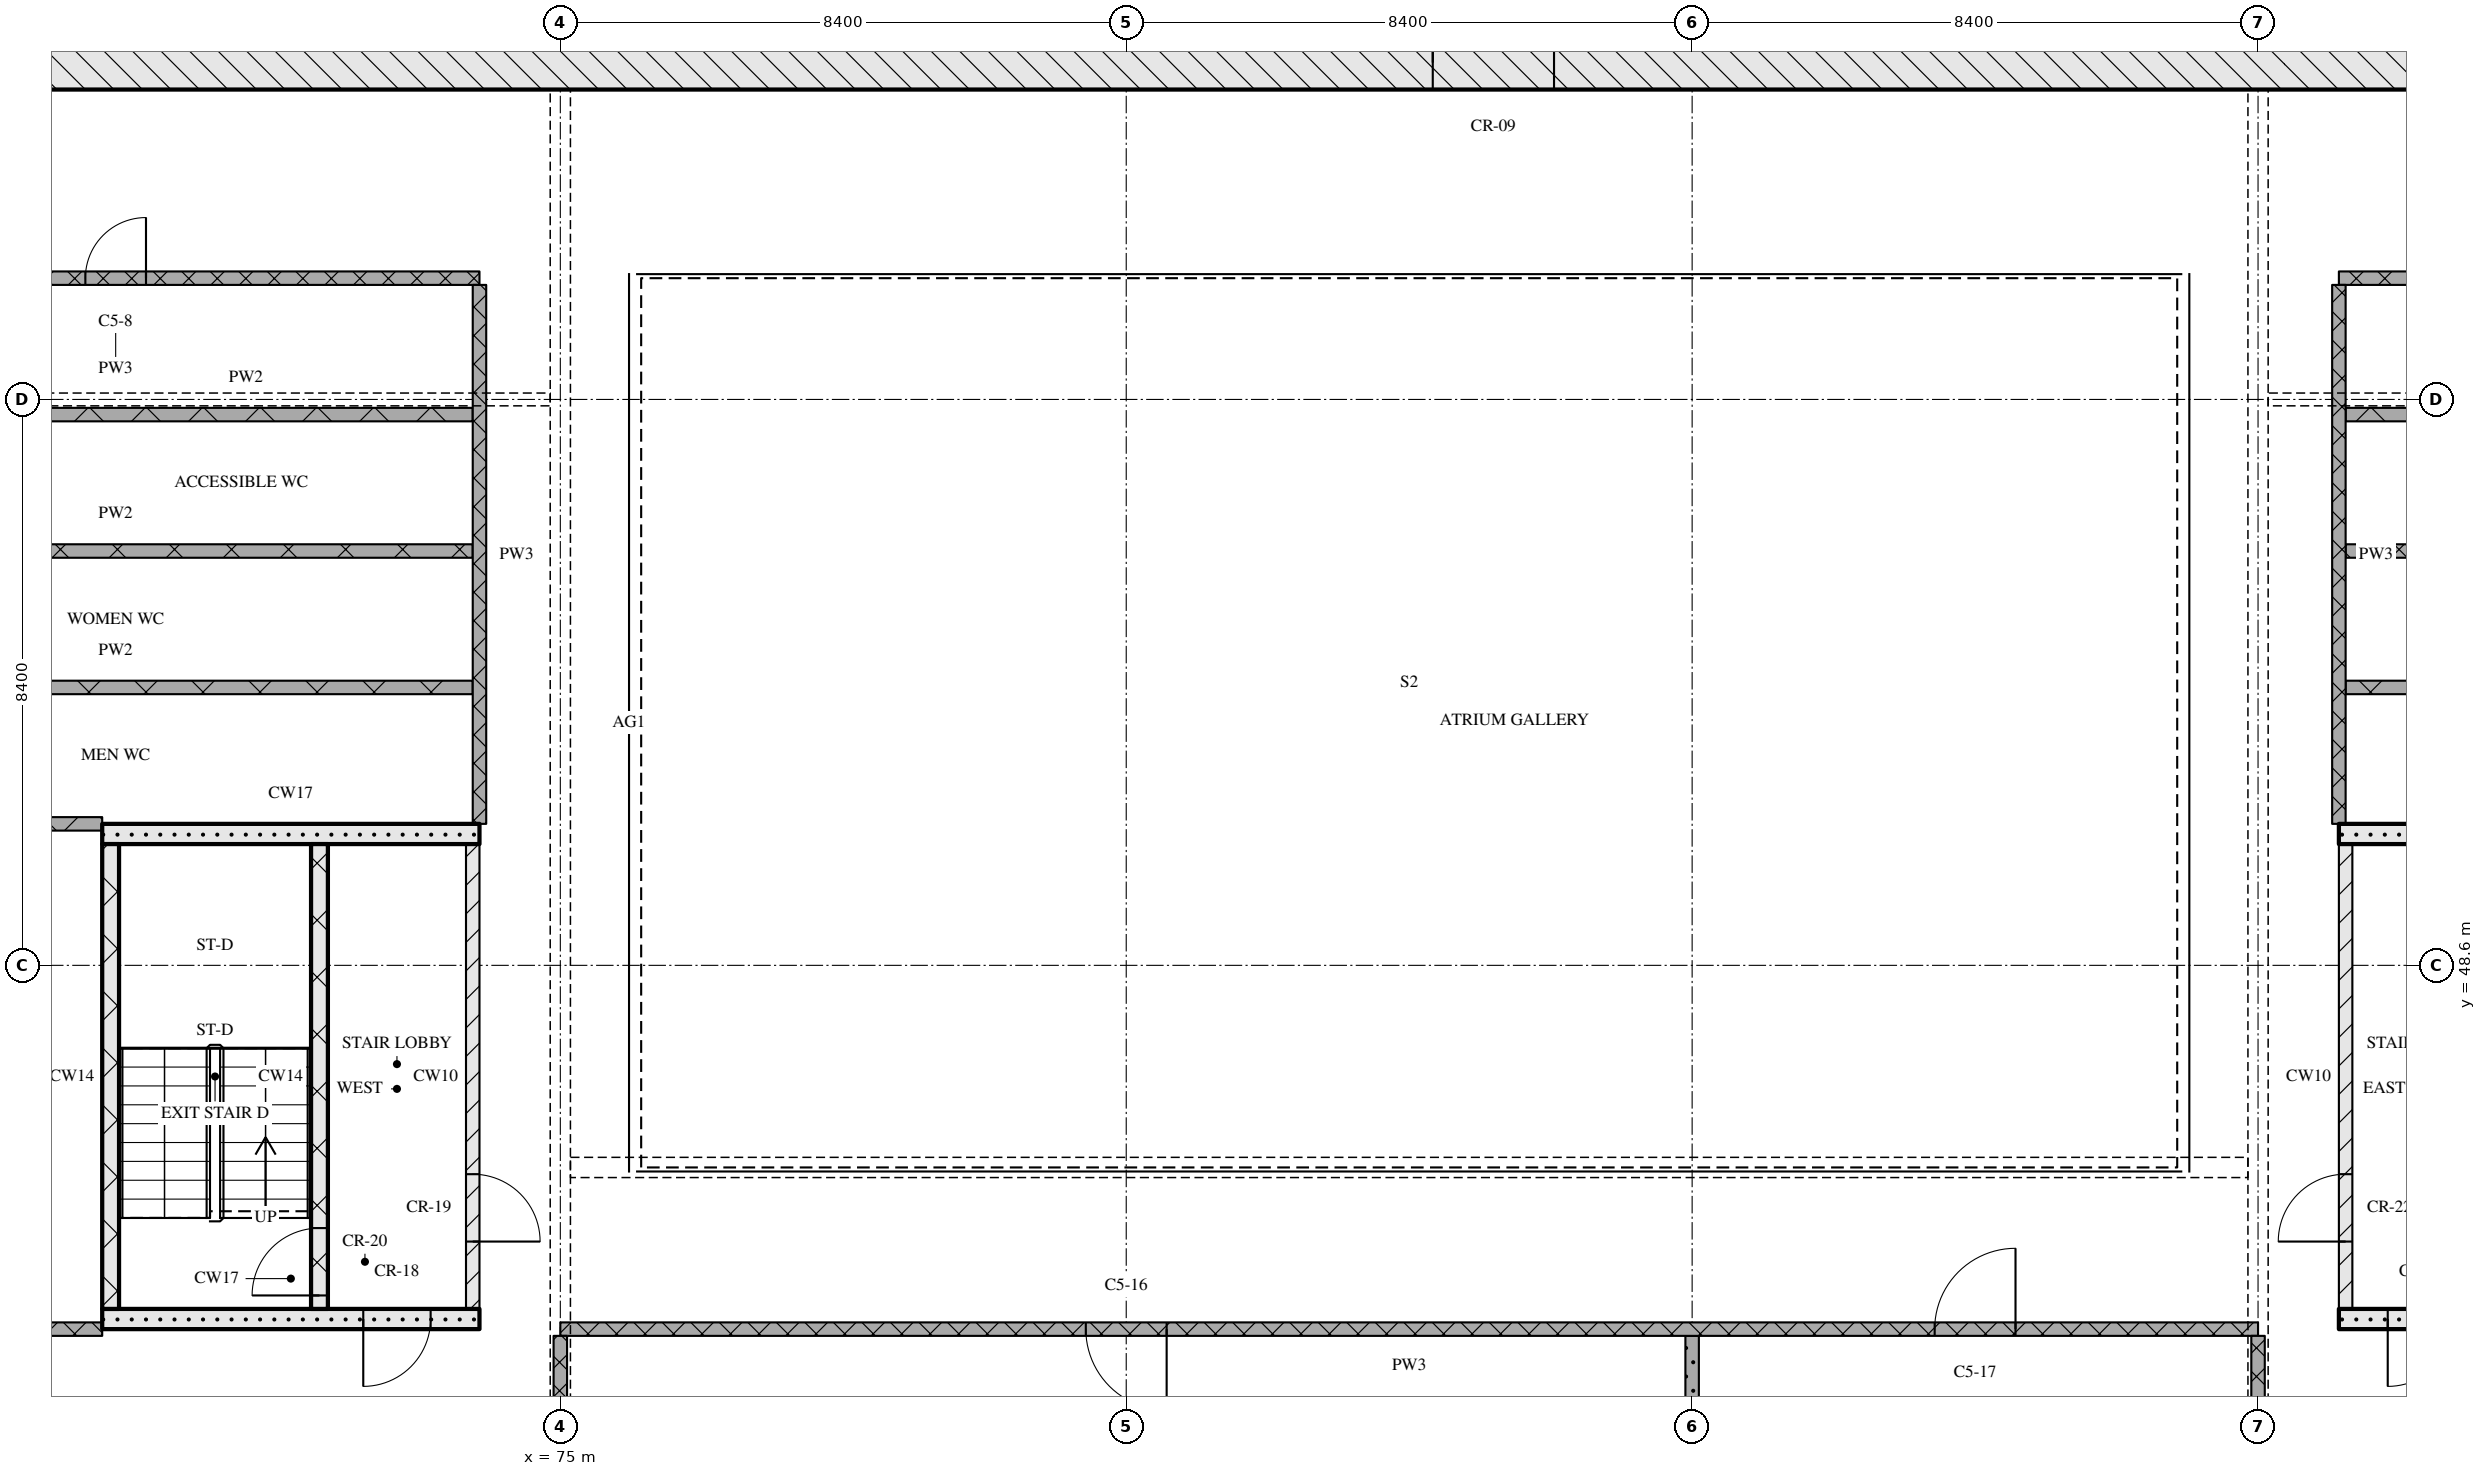
"""IFC4 building model, lengths in metres.
Left out: names, types, materials, properties, quantities, classifications, styles, units other than length and angle.
Written with IfcOpenShell. Run it as: python <this file> out.ifc"""

import sys

from ifc_helpers import new_model, si_unit, direction, frame, frame_2d, origin, place, context, subcontext, project, spatial, rectangle, extrude, element, fill, save


model = new_model("IFC4")
c1 = context("Model", 3, precision=1e-05, world=origin(), true_north=direction((0.0, 1.0)))
c2 = subcontext(c1, "Body", "Model", "MODEL_VIEW")
j1 = project(units=[si_unit("LENGTHUNIT", "METRE"), si_unit("PLANEANGLEUNIT", "RADIAN")], contexts=[c1])
p1 = place(None, origin())
s1 = spatial("IfcSite", under=j1, at=p1, CompositionType="ELEMENT")
p2 = place(p1, origin())
s2 = spatial("IfcBuilding", under=s1, at=p2, CompositionType="ELEMENT")
p3 = place(p2, frame((0.0, 0.0, 190.65)))
s3 = spatial("IfcBuildingStorey", under=s2, at=p3, CompositionType="ELEMENT", Elevation=190.65)
p4 = place(p3, frame((67.0, 62.0, 0.0), z_axis=(0.0, 0.0, 1.0), x_axis=(1.0, 0.0, 0.0)))
e1 = element("IfcWall", 1, at=p4, inside=s3, PredefinedType="SOLIDWALL", context=c2, shape_type="SweptSolid", body=[
    extrude(rectangle(XDim=41.2, YDim=0.8, at=frame_2d((20.6, 0.0))), origin(), (0.0, 0.0, 1.0), 3.3),
])
p5 = place(p4, frame((20.95, 0.0, 0.0)))
e2 = element("IfcOpeningElement", 2, at=p5, cuts=e1, PredefinedType="OPENING", context=c2, shape_type="SweptSolid", body=[
    extrude(rectangle(XDim=1.8, YDim=2.1, at=frame_2d((0.9, 1.05))), frame((0.0, 0.41, 0.0), z_axis=(0.0, -1.0, 0.0), x_axis=(1.0, 0.0, 0.0)), (0.0, 0.0, 1.0), 0.82),
])
p6 = place(p3, frame((68.2, 43.35, 0.0), z_axis=(0.0, 0.0, 1.0), x_axis=(1.0, 0.0, 0.0)))
e3 = element("IfcWall", 3, at=p6, inside=s3, PredefinedType="SOLIDWALL", context=c2, shape_type="SweptSolid", body=[
    extrude(rectangle(XDim=5.6, YDim=0.3, at=frame_2d((2.8, 0.0))), origin(), (0.0, 0.0, 1.0), 3.3),
])
p7 = place(p6, frame((3.875, 0.0, 0.0)))
e4 = element("IfcOpeningElement", 4, at=p7, cuts=e3, PredefinedType="OPENING", context=c2, shape_type="SweptSolid", body=[
    extrude(rectangle(XDim=1.0, YDim=2.1, at=frame_2d((0.5, 1.05))), frame((0.0, 0.16, 0.0), z_axis=(0.0, -1.0, 0.0), x_axis=(1.0, 0.0, 0.0)), (0.0, 0.0, 1.0), 0.32),
])
p8 = place(p3, frame((68.325, 43.5, 0.0), z_axis=(0.0, 0.0, 1.0), x_axis=(0.0, 1.0, 0.0)))
e5 = element("IfcWall", 5, at=p8, inside=s3, PredefinedType="SOLIDWALL", context=c2, shape_type="SweptSolid", body=[
    extrude(rectangle(XDim=6.9, YDim=0.25, at=frame_2d((3.45, 0.0))), origin(), (0.0, 0.0, 1.0), 3.3),
])
p9 = place(p3, frame((71.425, 43.5, 0.0), z_axis=(0.0, 0.0, 1.0), x_axis=(0.0, 1.0, 0.0)))
e6 = element("IfcWall", 6, at=p9, inside=s3, PredefinedType="SOLIDWALL", context=c2, shape_type="SweptSolid", body=[
    extrude(rectangle(XDim=6.9, YDim=0.25, at=frame_2d((3.45, 0.0))), origin(), (0.0, 0.0, 1.0), 3.3),
])
p10 = place(p9, frame((0.2, 0.0, 0.0)))
e7 = element("IfcOpeningElement", 7, at=p10, cuts=e6, PredefinedType="OPENING", context=c2, shape_type="SweptSolid", body=[
    extrude(rectangle(XDim=1.0, YDim=2.1, at=frame_2d((0.5, 1.05))), frame((0.0, 0.135, 0.0), z_axis=(0.0, -1.0, 0.0), x_axis=(1.0, 0.0, 0.0)), (0.0, 0.0, 1.0), 0.27),
])
p11 = place(p3, frame((73.7, 43.5, 0.0), z_axis=(0.0, 0.0, 1.0), x_axis=(0.0, 1.0, 0.0)))
e8 = element("IfcWall", 8, at=p11, inside=s3, PredefinedType="PARTITIONING", context=c2, shape_type="SweptSolid", body=[
    extrude(rectangle(XDim=6.9, YDim=0.2, at=frame_2d((3.45, 0.0))), origin(), (0.0, 0.0, 1.0), 3.3),
])
p12 = place(p11, frame((1.0, 0.0, 0.0)))
e9 = element("IfcOpeningElement", 9, at=p12, cuts=e8, PredefinedType="OPENING", context=c2, shape_type="SweptSolid", body=[
    extrude(rectangle(XDim=1.0, YDim=2.1, at=frame_2d((0.5, 1.05))), frame((0.0, 0.11, 0.0), z_axis=(0.0, -1.0, 0.0), x_axis=(1.0, 0.0, 0.0)), (0.0, 0.0, 1.0), 0.22),
])
p13 = place(p3, frame((68.2, 50.55, 0.0), z_axis=(0.0, 0.0, 1.0), x_axis=(1.0, 0.0, 0.0)))
e10 = element("IfcWall", 10, at=p13, inside=s3, PredefinedType="SOLIDWALL", context=c2, shape_type="SweptSolid", body=[
    extrude(rectangle(XDim=5.6, YDim=0.3, at=frame_2d((2.8, 0.0))), origin(), (0.0, 0.0, 1.0), 3.3),
])
p14 = place(p3, frame((101.4, 43.35, 0.0), z_axis=(0.0, 0.0, 1.0), x_axis=(1.0, 0.0, 0.0)))
e11 = element("IfcWall", 11, at=p14, inside=s3, PredefinedType="SOLIDWALL", context=c2, shape_type="SweptSolid", body=[
    extrude(rectangle(XDim=5.6, YDim=0.3, at=frame_2d((2.8, 0.0))), origin(), (0.0, 0.0, 1.0), 3.3),
])
p15 = place(p14, frame((0.725, 0.0, 0.0)))
e12 = element("IfcOpeningElement", 12, at=p15, cuts=e11, PredefinedType="OPENING", context=c2, shape_type="SweptSolid", body=[
    extrude(rectangle(XDim=1.0, YDim=2.1, at=frame_2d((0.5, 1.05))), frame((0.0, 0.16, 0.0), z_axis=(0.0, -1.0, 0.0), x_axis=(1.0, 0.0, 0.0)), (0.0, 0.0, 1.0), 0.32),
])
p16 = place(p3, frame((101.5, 43.5, 0.0), z_axis=(0.0, 0.0, 1.0), x_axis=(0.0, 1.0, 0.0)))
e13 = element("IfcWall", 13, at=p16, inside=s3, PredefinedType="PARTITIONING", context=c2, shape_type="SweptSolid", body=[
    extrude(rectangle(XDim=6.9, YDim=0.2, at=frame_2d((3.45, 0.0))), origin(), (0.0, 0.0, 1.0), 3.3),
])
p17 = place(p16, frame((1.0, 0.0, 0.0)))
e14 = element("IfcOpeningElement", 14, at=p17, cuts=e13, PredefinedType="OPENING", context=c2, shape_type="SweptSolid", body=[
    extrude(rectangle(XDim=1.0, YDim=2.1, at=frame_2d((0.5, 1.05))), frame((0.0, 0.11, 0.0), z_axis=(0.0, -1.0, 0.0), x_axis=(1.0, 0.0, 0.0)), (0.0, 0.0, 1.0), 0.22),
])
p18 = place(p3, frame((101.4, 50.55, 0.0), z_axis=(0.0, 0.0, 1.0), x_axis=(1.0, 0.0, 0.0)))
e15 = element("IfcWall", 15, at=p18, inside=s3, PredefinedType="SOLIDWALL", context=c2, shape_type="SweptSolid", body=[
    extrude(rectangle(XDim=5.6, YDim=0.3, at=frame_2d((2.8, 0.0))), origin(), (0.0, 0.0, 1.0), 3.3),
])
p19 = place(p3, frame((63.0, 43.2, 0.0), z_axis=(0.0, 0.0, 1.0), x_axis=(1.0, 0.0, 0.0)))
e16 = element("IfcWall", 16, at=p19, inside=s3, PredefinedType="PARTITIONING", context=c2, shape_type="SweptSolid", body=[
    extrude(rectangle(XDim=5.2, YDim=0.2, at=frame_2d((2.6, 0.0))), origin(), (0.0, 0.0, 1.0), 3.3),
])
p20 = place(p3, frame((100.2, 43.2, 0.0), z_axis=(0.0, 0.0, 1.0), x_axis=(-1.0, 0.0, 0.0)))
e17 = element("IfcWall", 17, at=p20, inside=s3, PredefinedType="PARTITIONING", context=c2, shape_type="SweptSolid", body=[
    extrude(rectangle(XDim=25.2, YDim=0.2, at=frame_2d((12.6, 0.0))), origin(), (0.0, 0.0, 1.0), 3.3),
])
p21 = place(p20, frame((3.6, 0.0, 0.0)))
e18 = element("IfcOpeningElement", 18, at=p21, cuts=e17, PredefinedType="OPENING", context=c2, shape_type="SweptSolid", body=[
    extrude(rectangle(XDim=1.2, YDim=2.1, at=frame_2d((0.6, 1.05))), frame((0.0, 0.11, 0.0), z_axis=(0.0, -1.0, 0.0), x_axis=(1.0, 0.0, 0.0)), (0.0, 0.0, 1.0), 0.22),
])
p22 = place(p20, frame((16.2, 0.0, 0.0)))
e19 = element("IfcOpeningElement", 19, at=p22, cuts=e17, PredefinedType="OPENING", context=c2, shape_type="SweptSolid", body=[
    extrude(rectangle(XDim=1.2, YDim=2.1, at=frame_2d((0.6, 1.05))), frame((0.0, 0.11, 0.0), z_axis=(0.0, -1.0, 0.0), x_axis=(1.0, 0.0, 0.0)), (0.0, 0.0, 1.0), 0.22),
])
p23 = place(p3, frame((63.1, 50.7, 0.0), z_axis=(0.0, 0.0, 1.0), x_axis=(1.0, 0.0, 0.0)))
e20 = element("IfcWall", 20, at=p23, inside=s3, PredefinedType="PARTITIONING", context=c2, shape_type="SweptSolid", body=[
    extrude(rectangle(XDim=5.1, YDim=0.2, at=frame_2d((2.55, 0.0))), origin(), (0.0, 0.0, 1.0), 3.3),
])
p24 = place(p3, frame((63.1, 52.725, 0.0), z_axis=(0.0, 0.0, 1.0), x_axis=(1.0, 0.0, 0.0)))
e21 = element("IfcWall", 21, at=p24, inside=s3, PredefinedType="PARTITIONING", context=c2, shape_type="SweptSolid", body=[
    extrude(rectangle(XDim=10.6, YDim=0.2, at=frame_2d((5.3, 0.0))), origin(), (0.0, 0.0, 1.0), 3.3),
])
p25 = place(p3, frame((101.5, 52.725, 0.0), z_axis=(0.0, 0.0, 1.0), x_axis=(1.0, 0.0, 0.0)))
e22 = element("IfcWall", 22, at=p25, inside=s3, PredefinedType="PARTITIONING", context=c2, shape_type="SweptSolid", body=[
    extrude(rectangle(XDim=10.6, YDim=0.2, at=frame_2d((5.3, 0.0))), origin(), (0.0, 0.0, 1.0), 3.3),
])
p26 = place(p3, frame((63.1, 54.75, 0.0), z_axis=(0.0, 0.0, 1.0), x_axis=(1.0, 0.0, 0.0)))
e23 = element("IfcWall", 23, at=p26, inside=s3, PredefinedType="PARTITIONING", context=c2, shape_type="SweptSolid", body=[
    extrude(rectangle(XDim=10.6, YDim=0.2, at=frame_2d((5.3, 0.0))), origin(), (0.0, 0.0, 1.0), 3.3),
])
p27 = place(p3, frame((101.5, 54.75, 0.0), z_axis=(0.0, 0.0, 1.0), x_axis=(1.0, 0.0, 0.0)))
e24 = element("IfcWall", 24, at=p27, inside=s3, PredefinedType="PARTITIONING", context=c2, shape_type="SweptSolid", body=[
    extrude(rectangle(XDim=10.6, YDim=0.2, at=frame_2d((5.3, 0.0))), origin(), (0.0, 0.0, 1.0), 3.3),
])
for number, where, z_axis, x_axis in (
    (25, (66.97, 56.775, 0.0), (0.0, 0.0, 1.0), (1.0, 0.0, 0.0)),
    (26, (101.5, 56.775, 0.0), (0.0, 0.0, 1.0), (1.0, 0.0, 0.0)),
):
    element("IfcWall", number, at=place(p3, frame(where, z_axis=z_axis, x_axis=x_axis)), inside=s3, PredefinedType="PARTITIONING", context=c2, shape_type="SweptSolid", body=[
        extrude(rectangle(XDim=6.73, YDim=0.2, at=frame_2d((3.365, 0.0))), origin(), (0.0, 0.0, 1.0), 3.3),
    ])
p28 = place(p3, frame((73.8, 58.8, 0.0), z_axis=(0.0, 0.0, 1.0), x_axis=(-1.0, 0.0, 0.0)))
e27 = element("IfcWall", 27, at=p28, inside=s3, PredefinedType="PARTITIONING", context=c2, shape_type="SweptSolid", body=[
    extrude(rectangle(XDim=10.8, YDim=0.2, at=frame_2d((5.4, 0.0))), origin(), (0.0, 0.0, 1.0), 3.3),
])
p29 = place(p28, frame((4.95, 0.0, 0.0)))
e28 = element("IfcOpeningElement", 28, at=p29, cuts=e27, PredefinedType="OPENING", context=c2, shape_type="SweptSolid", body=[
    extrude(rectangle(XDim=0.9, YDim=2.1, at=frame_2d((0.45, 1.05))), frame((0.0, 0.11, 0.0), z_axis=(0.0, -1.0, 0.0), x_axis=(1.0, 0.0, 0.0)), (0.0, 0.0, 1.0), 0.22),
])
p30 = place(p3, frame((101.4, 58.8, 0.0), z_axis=(0.0, 0.0, 1.0), x_axis=(1.0, 0.0, 0.0)))
e29 = element("IfcWall", 29, at=p30, inside=s3, PredefinedType="PARTITIONING", context=c2, shape_type="SweptSolid", body=[
    extrude(rectangle(XDim=10.8, YDim=0.2, at=frame_2d((5.4, 0.0))), origin(), (0.0, 0.0, 1.0), 3.3),
])
p31 = place(p3, frame((73.8, 58.7, 0.0), z_axis=(0.0, 0.0, 1.0), x_axis=(0.0, -1.0, 0.0)))
e30 = element("IfcWall", 30, at=p31, inside=s3, PredefinedType="PARTITIONING", context=c2, shape_type="SweptSolid", body=[
    extrude(rectangle(XDim=8.0, YDim=0.2, at=frame_2d((4.0, 0.0))), origin(), (0.0, 0.0, 1.0), 3.3),
])
p32 = place(p3, frame((75.0, 43.1, 0.0), z_axis=(0.0, 0.0, 1.0), x_axis=(0.0, -1.0, 0.0)))
e31 = element("IfcWall", 31, at=p32, inside=s3, PredefinedType="PARTITIONING", context=c2, shape_type="SweptSolid", body=[
    extrude(rectangle(XDim=2.2, YDim=0.2, at=frame_2d((1.1, 0.0))), origin(), (0.0, 0.0, 1.0), 2.41),
])
p33 = place(p3, frame((91.8, 43.1, 0.0), z_axis=(0.0, 0.0, 1.0), x_axis=(0.0, -1.0, 0.0)))
e32 = element("IfcWall", 32, at=p33, inside=s3, PredefinedType="PARTITIONING", context=c2, shape_type="SweptSolid", body=[
    extrude(rectangle(XDim=2.53, YDim=0.2, at=frame_2d((1.265, 0.0))), origin(), (0.0, 0.0, 1.0), 3.3),
])
p34 = place(p3, frame((100.2, 43.1, 0.0), z_axis=(0.0, 0.0, 1.0), x_axis=(0.0, -1.0, 0.0)))
e33 = element("IfcWall", 33, at=p34, inside=s3, PredefinedType="PARTITIONING", context=c2, shape_type="SweptSolid", body=[
    extrude(rectangle(XDim=2.2, YDim=0.2, at=frame_2d((1.1, 0.0))), origin(), (0.0, 0.0, 1.0), 2.41),
])
p35 = place(p3, frame((101.4, 58.7, 0.0), z_axis=(0.0, 0.0, 1.0), x_axis=(0.0, -1.0, 0.0)))
e34 = element("IfcWall", 34, at=p35, inside=s3, PredefinedType="PARTITIONING", context=c2, shape_type="SweptSolid", body=[
    extrude(rectangle(XDim=8.0, YDim=0.2, at=frame_2d((4.0, 0.0))), origin(), (0.0, 0.0, 1.0), 3.3),
])
p36 = place(p5, origin())
e35 = element("IfcDoor", 35, at=p36, inside=s3, OperationType="DOUBLE_DOOR_SINGLE_SWING", PredefinedType="DOOR", context=c2, shape_type="SweptSolid", body=[
    extrude(rectangle(XDim=1.8, YDim=2.1, at=frame_2d((0.9, 1.05))), frame((0.0, 0.025, 0.0), z_axis=(0.0, -1.0, 0.0), x_axis=(1.0, 0.0, 0.0)), (0.0, 0.0, 1.0), 0.05),
])
fill(e2, e35)
p37 = place(p7, origin())
e36 = element("IfcDoor", 36, at=p37, inside=s3, OperationType="SINGLE_SWING_RIGHT", PredefinedType="DOOR", context=c2, shape_type="SweptSolid", body=[
    extrude(rectangle(XDim=1.0, YDim=2.1, at=frame_2d((0.5, 1.05))), frame((0.0, 0.025, 0.0), z_axis=(0.0, -1.0, 0.0), x_axis=(1.0, 0.0, 0.0)), (0.0, 0.0, 1.0), 0.05),
])
fill(e4, e36)
p38 = place(p10, origin())
e37 = element("IfcDoor", 37, at=p38, inside=s3, OperationType="SINGLE_SWING_LEFT", PredefinedType="DOOR", context=c2, shape_type="SweptSolid", body=[
    extrude(rectangle(XDim=1.0, YDim=2.1, at=frame_2d((0.5, 1.05))), frame((0.0, 0.025, 0.0), z_axis=(0.0, -1.0, 0.0), x_axis=(1.0, 0.0, 0.0)), (0.0, 0.0, 1.0), 0.05),
])
fill(e7, e37)
p39 = place(p12, origin())
e38 = element("IfcDoor", 38, at=p39, inside=s3, OperationType="SINGLE_SWING_RIGHT", PredefinedType="DOOR", context=c2, shape_type="SweptSolid", body=[
    extrude(rectangle(XDim=1.0, YDim=2.1, at=frame_2d((0.5, 1.05))), frame((0.0, 0.025, 0.0), z_axis=(0.0, -1.0, 0.0), x_axis=(1.0, 0.0, 0.0)), (0.0, 0.0, 1.0), 0.05),
])
fill(e9, e38)
p40 = place(p15, origin())
e39 = element("IfcDoor", 39, at=p40, inside=s3, OperationType="SINGLE_SWING_RIGHT", PredefinedType="DOOR", context=c2, shape_type="SweptSolid", body=[
    extrude(rectangle(XDim=1.0, YDim=2.1, at=frame_2d((0.5, 1.05))), frame((0.0, 0.025, 0.0), z_axis=(0.0, -1.0, 0.0), x_axis=(1.0, 0.0, 0.0)), (0.0, 0.0, 1.0), 0.05),
])
fill(e12, e39)
p41 = place(p17, origin())
e40 = element("IfcDoor", 40, at=p41, inside=s3, OperationType="SINGLE_SWING_LEFT", PredefinedType="DOOR", context=c2, shape_type="SweptSolid", body=[
    extrude(rectangle(XDim=1.0, YDim=2.1, at=frame_2d((0.5, 1.05))), frame((0.0, 0.025, 0.0), z_axis=(0.0, -1.0, 0.0), x_axis=(1.0, 0.0, 0.0)), (0.0, 0.0, 1.0), 0.05),
])
fill(e14, e40)
p42 = place(p21, origin())
e41 = element("IfcDoor", 41, at=p42, inside=s3, OperationType="SINGLE_SWING_RIGHT", PredefinedType="DOOR", context=c2, shape_type="SweptSolid", body=[
    extrude(rectangle(XDim=1.2, YDim=2.1, at=frame_2d((0.6, 1.05))), frame((0.0, 0.025, 0.0), z_axis=(0.0, -1.0, 0.0), x_axis=(1.0, 0.0, 0.0)), (0.0, 0.0, 1.0), 0.05),
])
fill(e18, e41)
p43 = place(p22, origin())
e42 = element("IfcDoor", 42, at=p43, inside=s3, OperationType="SINGLE_SWING_LEFT", PredefinedType="DOOR", context=c2, shape_type="SweptSolid", body=[
    extrude(rectangle(XDim=1.2, YDim=2.1, at=frame_2d((0.6, 1.05))), frame((0.0, 0.025, 0.0), z_axis=(0.0, -1.0, 0.0), x_axis=(1.0, 0.0, 0.0)), (0.0, 0.0, 1.0), 0.05),
])
fill(e19, e42)
p44 = place(p29, origin())
e43 = element("IfcDoor", 43, at=p44, inside=s3, OperationType="SINGLE_SWING_RIGHT", PredefinedType="DOOR", context=c2, shape_type="SweptSolid", body=[
    extrude(rectangle(XDim=0.9, YDim=2.1, at=frame_2d((0.45, 1.05))), frame((0.0, 0.025, 0.0), z_axis=(0.0, -1.0, 0.0), x_axis=(1.0, 0.0, 0.0)), (0.0, 0.0, 1.0), 0.05),
])
fill(e28, e43)
save(model, sys.argv[1])
